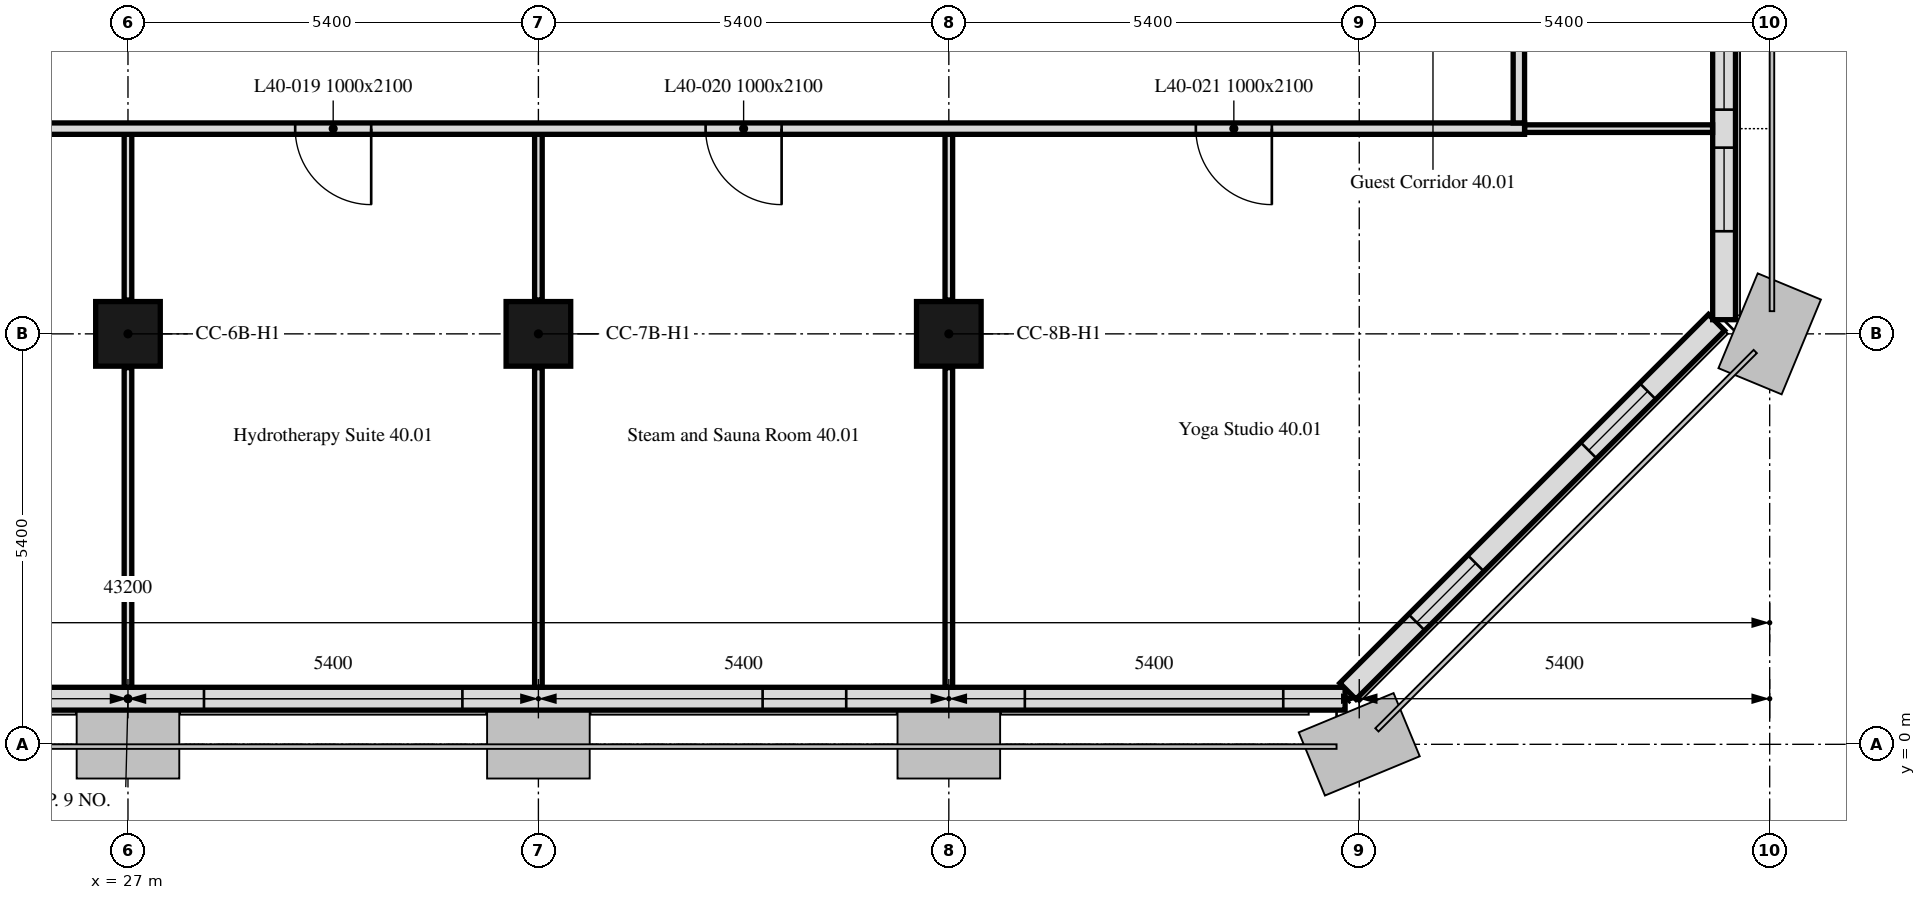
"""IFC4 building model, lengths in metres.
Left out: names, types, materials, properties, quantities, classifications, styles, units other than length and angle.
Written with IfcOpenShell. Run it as: python <this file> out.ifc"""

import sys

from ifc_helpers import new_model, si_unit, direction, frame, frame_2d, origin, origin_2d, place, context, subcontext, project, spatial, rectangle, extrude, element, fill, save


model = new_model("IFC4")
c1 = context("Model", 3, precision=1e-05, world=origin(), true_north=direction((0.0, 1.0)))
c2 = subcontext(c1, "Body", "Model", "MODEL_VIEW")
j1 = project(units=[si_unit("LENGTHUNIT", "METRE"), si_unit("PLANEANGLEUNIT", "RADIAN")], contexts=[c1])
p1 = place(None, origin())
s1 = spatial("IfcSite", under=j1, at=p1, CompositionType="ELEMENT")
p2 = place(p1, origin())
s2 = spatial("IfcBuilding", under=s1, at=p2, CompositionType="ELEMENT")
p3 = place(p2, frame((0.0, 0.0, 169.3)))
s3 = spatial("IfcBuildingStorey", under=s2, at=p3, CompositionType="ELEMENT", Elevation=169.3)
for number, where, z_axis, x_axis in (
    (1, (27.0, 5.4, 0.0), (0.0, 0.0, 1.0), (1.0, 0.0, 0.0)),
    (2, (32.4, 5.4, 0.0), (0.0, 0.0, 1.0), (1.0, 0.0, 0.0)),
    (3, (37.8, 5.4, 0.0), (0.0, 0.0, 1.0), (1.0, 0.0, 0.0)),
):
    element("IfcColumn", number, at=place(p3, frame(where, z_axis=z_axis, x_axis=x_axis)), inside=s3, PredefinedType="COLUMN", context=c2, shape_type="SweptSolid", body=[
        extrude(rectangle(XDim=0.85, YDim=0.85, at=origin_2d()), origin(), (0.0, 0.0, 1.0), 3.0),
    ])
p4 = place(p3, frame((10.986, 0.6, 0.0), z_axis=(0.0, 0.0, 1.0), x_axis=(1.0, 0.0, 0.0)))
e4 = element("IfcWall", 4, at=p4, inside=s3, PredefinedType="SOLIDWALL", context=c2, shape_type="SweptSolid", body=[
    extrude(rectangle(XDim=32.027, YDim=0.3, at=frame_2d((16.014, 0.0))), origin(), (0.0, 0.0, 1.0), 3.0),
])
p5 = place(p4, frame((2.764, 0.0, 0.9)))
e5 = element("IfcOpeningElement", 5, at=p5, cuts=e4, PredefinedType="OPENING", context=c2, shape_type="SweptSolid", body=[
    extrude(rectangle(XDim=1.1, YDim=1.7, at=frame_2d((0.55, 0.85))), frame((0.0, 0.16, 0.0), z_axis=(0.0, -1.0, 0.0), x_axis=(1.0, 0.0, 0.0)), (0.0, 0.0, 1.0), 0.32),
])
p6 = place(p4, frame((6.214, 0.0, 0.9)))
e6 = element("IfcOpeningElement", 6, at=p6, cuts=e4, PredefinedType="OPENING", context=c2, shape_type="SweptSolid", body=[
    extrude(rectangle(XDim=3.4, YDim=1.7, at=frame_2d((1.7, 0.85))), frame((0.0, 0.16, 0.0), z_axis=(0.0, -1.0, 0.0), x_axis=(1.0, 0.0, 0.0)), (0.0, 0.0, 1.0), 0.32),
])
p7 = place(p4, frame((13.564, 0.0, 0.9)))
e7 = element("IfcOpeningElement", 7, at=p7, cuts=e4, PredefinedType="OPENING", context=c2, shape_type="SweptSolid", body=[
    extrude(rectangle(XDim=1.1, YDim=1.7, at=frame_2d((0.55, 0.85))), frame((0.0, 0.16, 0.0), z_axis=(0.0, -1.0, 0.0), x_axis=(1.0, 0.0, 0.0)), (0.0, 0.0, 1.0), 0.32),
])
p8 = place(p4, frame((17.014, 0.0, 0.9)))
e8 = element("IfcOpeningElement", 8, at=p8, cuts=e4, PredefinedType="OPENING", context=c2, shape_type="SweptSolid", body=[
    extrude(rectangle(XDim=3.4, YDim=1.7, at=frame_2d((1.7, 0.85))), frame((0.0, 0.16, 0.0), z_axis=(0.0, -1.0, 0.0), x_axis=(1.0, 0.0, 0.0)), (0.0, 0.0, 1.0), 0.32),
])
p9 = place(p4, frame((24.364, 0.0, 0.9)))
e9 = element("IfcOpeningElement", 9, at=p9, cuts=e4, PredefinedType="OPENING", context=c2, shape_type="SweptSolid", body=[
    extrude(rectangle(XDim=1.1, YDim=1.7, at=frame_2d((0.55, 0.85))), frame((0.0, 0.16, 0.0), z_axis=(0.0, -1.0, 0.0), x_axis=(1.0, 0.0, 0.0)), (0.0, 0.0, 1.0), 0.32),
])
p10 = place(p4, frame((27.814, 0.0, 0.9)))
e10 = element("IfcOpeningElement", 10, at=p10, cuts=e4, PredefinedType="OPENING", context=c2, shape_type="SweptSolid", body=[
    extrude(rectangle(XDim=3.4, YDim=1.7, at=frame_2d((1.7, 0.85))), frame((0.0, 0.16, 0.0), z_axis=(0.0, -1.0, 0.0), x_axis=(1.0, 0.0, 0.0)), (0.0, 0.0, 1.0), 0.32),
])
p11 = place(p3, frame((43.051, 0.699, 0.0), z_axis=(0.0, 0.0, 1.0), x_axis=(0.707106781187, 0.707106781187, 0.0)))
e11 = element("IfcWall", 11, at=p11, inside=s3, PredefinedType="SOLIDWALL", context=c2, shape_type="SweptSolid", body=[
    extrude(rectangle(XDim=6.86, YDim=0.3, at=frame_2d((3.43, 0.0))), origin(), (0.0, 0.0, 1.0), 3.0),
])
p12 = place(p11, frame((1.28, 0.0, 0.9)))
e12 = element("IfcOpeningElement", 12, at=p12, cuts=e11, PredefinedType="OPENING", context=c2, shape_type="SweptSolid", body=[
    extrude(rectangle(XDim=1.1, YDim=1.7, at=frame_2d((0.55, 0.85))), frame((0.0, 0.16, 0.0), z_axis=(0.0, -1.0, 0.0), x_axis=(1.0, 0.0, 0.0)), (0.0, 0.0, 1.0), 0.32),
])
p13 = place(p11, frame((4.48, 0.0, 0.9)))
e13 = element("IfcOpeningElement", 13, at=p13, cuts=e11, PredefinedType="OPENING", context=c2, shape_type="SweptSolid", body=[
    extrude(rectangle(XDim=1.1, YDim=1.7, at=frame_2d((0.55, 0.85))), frame((0.0, 0.16, 0.0), z_axis=(0.0, -1.0, 0.0), x_axis=(1.0, 0.0, 0.0)), (0.0, 0.0, 1.0), 0.32),
])
p14 = place(p3, frame((48.0, 5.586, 0.0), z_axis=(0.0, 0.0, 1.0), x_axis=(0.0, 1.0, 0.0)))
e14 = element("IfcWall", 14, at=p14, inside=s3, PredefinedType="SOLIDWALL", context=c2, shape_type="SweptSolid", body=[
    extrude(rectangle(XDim=32.027, YDim=0.3, at=frame_2d((16.014, 0.0))), origin(), (0.0, 0.0, 1.0), 3.0),
])
p15 = place(p14, frame((1.164, 0.0, 0.9)))
e15 = element("IfcOpeningElement", 15, at=p15, cuts=e14, PredefinedType="OPENING", context=c2, shape_type="SweptSolid", body=[
    extrude(rectangle(XDim=1.1, YDim=1.7, at=frame_2d((0.55, 0.85))), frame((0.0, 0.16, 0.0), z_axis=(0.0, -1.0, 0.0), x_axis=(1.0, 0.0, 0.0)), (0.0, 0.0, 1.0), 0.32),
])
p16 = place(p14, frame((2.764, 0.0, 0.9)))
e16 = element("IfcOpeningElement", 16, at=p16, cuts=e14, PredefinedType="OPENING", context=c2, shape_type="SweptSolid", body=[
    extrude(rectangle(XDim=1.1, YDim=1.7, at=frame_2d((0.55, 0.85))), frame((0.0, 0.16, 0.0), z_axis=(0.0, -1.0, 0.0), x_axis=(1.0, 0.0, 0.0)), (0.0, 0.0, 1.0), 0.32),
])
p17 = place(p14, frame((6.214, 0.0, 0.9)))
e17 = element("IfcOpeningElement", 17, at=p17, cuts=e14, PredefinedType="OPENING", context=c2, shape_type="SweptSolid", body=[
    extrude(rectangle(XDim=3.4, YDim=1.7, at=frame_2d((1.7, 0.85))), frame((0.0, 0.16, 0.0), z_axis=(0.0, -1.0, 0.0), x_axis=(1.0, 0.0, 0.0)), (0.0, 0.0, 1.0), 0.32),
])
p18 = place(p14, frame((11.964, 0.0, 0.9)))
e18 = element("IfcOpeningElement", 18, at=p18, cuts=e14, PredefinedType="OPENING", context=c2, shape_type="SweptSolid", body=[
    extrude(rectangle(XDim=1.1, YDim=1.7, at=frame_2d((0.55, 0.85))), frame((0.0, 0.16, 0.0), z_axis=(0.0, -1.0, 0.0), x_axis=(1.0, 0.0, 0.0)), (0.0, 0.0, 1.0), 0.32),
])
p19 = place(p14, frame((13.564, 0.0, 0.9)))
e19 = element("IfcOpeningElement", 19, at=p19, cuts=e14, PredefinedType="OPENING", context=c2, shape_type="SweptSolid", body=[
    extrude(rectangle(XDim=1.1, YDim=1.7, at=frame_2d((0.55, 0.85))), frame((0.0, 0.16, 0.0), z_axis=(0.0, -1.0, 0.0), x_axis=(1.0, 0.0, 0.0)), (0.0, 0.0, 1.0), 0.32),
])
p20 = place(p14, frame((17.364, 0.0, 0.9)))
e20 = element("IfcOpeningElement", 20, at=p20, cuts=e14, PredefinedType="OPENING", context=c2, shape_type="SweptSolid", body=[
    extrude(rectangle(XDim=1.1, YDim=1.7, at=frame_2d((0.55, 0.85))), frame((0.0, 0.16, 0.0), z_axis=(0.0, -1.0, 0.0), x_axis=(1.0, 0.0, 0.0)), (0.0, 0.0, 1.0), 0.32),
])
p21 = place(p14, frame((18.964, 0.0, 0.9)))
e21 = element("IfcOpeningElement", 21, at=p21, cuts=e14, PredefinedType="OPENING", context=c2, shape_type="SweptSolid", body=[
    extrude(rectangle(XDim=1.1, YDim=1.7, at=frame_2d((0.55, 0.85))), frame((0.0, 0.16, 0.0), z_axis=(0.0, -1.0, 0.0), x_axis=(1.0, 0.0, 0.0)), (0.0, 0.0, 1.0), 0.32),
])
p22 = place(p14, frame((22.764, 0.0, 0.9)))
e22 = element("IfcOpeningElement", 22, at=p22, cuts=e14, PredefinedType="OPENING", context=c2, shape_type="SweptSolid", body=[
    extrude(rectangle(XDim=1.1, YDim=1.7, at=frame_2d((0.55, 0.85))), frame((0.0, 0.16, 0.0), z_axis=(0.0, -1.0, 0.0), x_axis=(1.0, 0.0, 0.0)), (0.0, 0.0, 1.0), 0.32),
])
p23 = place(p14, frame((24.364, 0.0, 0.9)))
e23 = element("IfcOpeningElement", 23, at=p23, cuts=e14, PredefinedType="OPENING", context=c2, shape_type="SweptSolid", body=[
    extrude(rectangle(XDim=1.1, YDim=1.7, at=frame_2d((0.55, 0.85))), frame((0.0, 0.16, 0.0), z_axis=(0.0, -1.0, 0.0), x_axis=(1.0, 0.0, 0.0)), (0.0, 0.0, 1.0), 0.32),
])
p24 = place(p14, frame((27.814, 0.0, 0.9)))
e24 = element("IfcOpeningElement", 24, at=p24, cuts=e14, PredefinedType="OPENING", context=c2, shape_type="SweptSolid", body=[
    extrude(rectangle(XDim=3.4, YDim=1.7, at=frame_2d((1.7, 0.85))), frame((0.0, 0.16, 0.0), z_axis=(0.0, -1.0, 0.0), x_axis=(1.0, 0.0, 0.0)), (0.0, 0.0, 1.0), 0.32),
])
p25 = place(p3, frame((45.375, 8.1, 0.0), z_axis=(0.0, 0.0, 1.0), x_axis=(1.0, 0.0, 0.0)))
e25 = element("IfcWall", 25, at=p25, inside=s3, PredefinedType="PARTITIONING", context=c2, shape_type="SweptSolid", body=[
    extrude(rectangle(XDim=2.474, YDim=0.1, at=frame_2d((1.237, 0.0))), origin(), (0.0, 0.0, 1.0), 3.0),
])
p26 = place(p3, frame((27.0, 0.751, 0.0), z_axis=(0.0, 0.0, 1.0), x_axis=(0.0, 1.0, 0.0)))
e26 = element("IfcWall", 26, at=p26, inside=s3, PredefinedType="PARTITIONING", context=c2, shape_type="SweptSolid", body=[
    extrude(rectangle(XDim=4.204, YDim=0.1, at=frame_2d((2.102, 0.0))), origin(), (0.0, 0.0, 1.0), 2.4),
])
p27 = place(p3, frame((27.0, 5.845, 0.0), z_axis=(0.0, 0.0, 1.0), x_axis=(0.0, 1.0, 0.0)))
e27 = element("IfcWall", 27, at=p27, inside=s3, PredefinedType="PARTITIONING", context=c2, shape_type="SweptSolid", body=[
    extrude(rectangle(XDim=2.18, YDim=0.1, at=frame_2d((1.09, 0.0))), origin(), (0.0, 0.0, 1.0), 2.4),
])
p28 = place(p3, frame((32.4, 0.751, 0.0), z_axis=(0.0, 0.0, 1.0), x_axis=(0.0, 1.0, 0.0)))
e28 = element("IfcWall", 28, at=p28, inside=s3, PredefinedType="PARTITIONING", context=c2, shape_type="SweptSolid", body=[
    extrude(rectangle(XDim=4.204, YDim=0.1, at=frame_2d((2.102, 0.0))), origin(), (0.0, 0.0, 1.0), 2.4),
])
p29 = place(p3, frame((32.4, 5.845, 0.0), z_axis=(0.0, 0.0, 1.0), x_axis=(0.0, 1.0, 0.0)))
e29 = element("IfcWall", 29, at=p29, inside=s3, PredefinedType="PARTITIONING", context=c2, shape_type="SweptSolid", body=[
    extrude(rectangle(XDim=2.18, YDim=0.1, at=frame_2d((1.09, 0.0))), origin(), (0.0, 0.0, 1.0), 2.4),
])
p30 = place(p3, frame((37.8, 0.751, 0.0), z_axis=(0.0, 0.0, 1.0), x_axis=(0.0, 1.0, 0.0)))
e30 = element("IfcWall", 30, at=p30, inside=s3, PredefinedType="PARTITIONING", context=c2, shape_type="SweptSolid", body=[
    extrude(rectangle(XDim=4.204, YDim=0.1, at=frame_2d((2.102, 0.0))), origin(), (0.0, 0.0, 1.0), 2.4),
])
p31 = place(p3, frame((37.8, 5.845, 0.0), z_axis=(0.0, 0.0, 1.0), x_axis=(0.0, 1.0, 0.0)))
e31 = element("IfcWall", 31, at=p31, inside=s3, PredefinedType="PARTITIONING", context=c2, shape_type="SweptSolid", body=[
    extrude(rectangle(XDim=2.18, YDim=0.1, at=frame_2d((1.09, 0.0))), origin(), (0.0, 0.0, 1.0), 2.4),
])
p32 = place(p3, frame((45.375, 8.1, 0.0), z_axis=(0.0, 0.0, 1.0), x_axis=(-1.0, 0.0, 0.0)))
e32 = element("IfcWall", 32, at=p32, inside=s3, PredefinedType="PARTITIONING", context=c2, shape_type="SweptSolid", body=[
    extrude(rectangle(XDim=39.224, YDim=0.15, at=frame_2d((19.612, 0.0))), origin(), (0.0, 0.0, 1.0), 2.4),
])
p33 = place(p32, frame((36.775, 0.0, 0.0)))
e33 = element("IfcOpeningElement", 33, at=p33, cuts=e32, PredefinedType="OPENING", context=c2, shape_type="SweptSolid", body=[
    extrude(rectangle(XDim=1.0, YDim=2.1, at=frame_2d((0.5, 1.05))), frame((0.0, 0.075, 0.0), z_axis=(0.0, -1.0, 0.0), x_axis=(1.0, 0.0, 0.0)), (0.0, 0.0, 1.0), 0.15),
])
p34 = place(p32, frame((31.375, 0.0, 0.0)))
e34 = element("IfcOpeningElement", 34, at=p34, cuts=e32, PredefinedType="OPENING", context=c2, shape_type="SweptSolid", body=[
    extrude(rectangle(XDim=1.0, YDim=2.1, at=frame_2d((0.5, 1.05))), frame((0.0, 0.075, 0.0), z_axis=(0.0, -1.0, 0.0), x_axis=(1.0, 0.0, 0.0)), (0.0, 0.0, 1.0), 0.15),
])
p35 = place(p32, frame((25.975, 0.0, 0.0)))
e35 = element("IfcOpeningElement", 35, at=p35, cuts=e32, PredefinedType="OPENING", context=c2, shape_type="SweptSolid", body=[
    extrude(rectangle(XDim=1.0, YDim=2.1, at=frame_2d((0.5, 1.05))), frame((0.0, 0.075, 0.0), z_axis=(0.0, -1.0, 0.0), x_axis=(1.0, 0.0, 0.0)), (0.0, 0.0, 1.0), 0.15),
])
p36 = place(p32, frame((20.575, 0.0, 0.0)))
e36 = element("IfcOpeningElement", 36, at=p36, cuts=e32, PredefinedType="OPENING", context=c2, shape_type="SweptSolid", body=[
    extrude(rectangle(XDim=1.0, YDim=2.1, at=frame_2d((0.5, 1.05))), frame((0.0, 0.075, 0.0), z_axis=(0.0, -1.0, 0.0), x_axis=(1.0, 0.0, 0.0)), (0.0, 0.0, 1.0), 0.15),
])
p37 = place(p32, frame((15.175, 0.0, 0.0)))
e37 = element("IfcOpeningElement", 37, at=p37, cuts=e32, PredefinedType="OPENING", context=c2, shape_type="SweptSolid", body=[
    extrude(rectangle(XDim=1.0, YDim=2.1, at=frame_2d((0.5, 1.05))), frame((0.0, 0.075, 0.0), z_axis=(0.0, -1.0, 0.0), x_axis=(1.0, 0.0, 0.0)), (0.0, 0.0, 1.0), 0.15),
])
p38 = place(p32, frame((9.775, 0.0, 0.0)))
e38 = element("IfcOpeningElement", 38, at=p38, cuts=e32, PredefinedType="OPENING", context=c2, shape_type="SweptSolid", body=[
    extrude(rectangle(XDim=1.0, YDim=2.1, at=frame_2d((0.5, 1.05))), frame((0.0, 0.075, 0.0), z_axis=(0.0, -1.0, 0.0), x_axis=(1.0, 0.0, 0.0)), (0.0, 0.0, 1.0), 0.15),
])
p39 = place(p32, frame((3.325, 0.0, 0.0)))
e39 = element("IfcOpeningElement", 39, at=p39, cuts=e32, PredefinedType="OPENING", context=c2, shape_type="SweptSolid", body=[
    extrude(rectangle(XDim=1.0, YDim=2.1, at=frame_2d((0.5, 1.05))), frame((0.0, 0.075, 0.0), z_axis=(0.0, -1.0, 0.0), x_axis=(1.0, 0.0, 0.0)), (0.0, 0.0, 1.0), 0.15),
])
p40 = place(p3, frame((45.3, 21.525, 0.0), z_axis=(0.0, 0.0, 1.0), x_axis=(0.0, -1.0, 0.0)))
e40 = element("IfcWall", 40, at=p40, inside=s3, PredefinedType="PARTITIONING", context=c2, shape_type="SweptSolid", body=[
    extrude(rectangle(XDim=13.35, YDim=0.15, at=frame_2d((6.675, 0.0))), origin(), (0.0, 0.0, 1.0), 2.4),
])
p41 = place(p40, frame((8.063, 0.0, 0.0)))
e41 = element("IfcOpeningElement", 41, at=p41, cuts=e40, PredefinedType="OPENING", context=c2, shape_type="SweptSolid", body=[
    extrude(rectangle(XDim=1.0, YDim=2.1, at=frame_2d((0.5, 1.05))), frame((0.0, 0.075, 0.0), z_axis=(0.0, -1.0, 0.0), x_axis=(1.0, 0.0, 0.0)), (0.0, 0.0, 1.0), 0.15),
])
p42 = place(p40, frame((2.125, 0.0, 0.0)))
e42 = element("IfcOpeningElement", 42, at=p42, cuts=e40, PredefinedType="OPENING", context=c2, shape_type="SweptSolid", body=[
    extrude(rectangle(XDim=1.0, YDim=2.1, at=frame_2d((0.5, 1.05))), frame((0.0, 0.075, 0.0), z_axis=(0.0, -1.0, 0.0), x_axis=(1.0, 0.0, 0.0)), (0.0, 0.0, 1.0), 0.15),
])
p43 = place(p8, origin())
e43 = element("IfcWindow", 43, at=p43, inside=s3, PartitioningType="SINGLE_PANEL", PredefinedType="WINDOW", context=c2, shape_type="SweptSolid", body=[
    extrude(rectangle(XDim=3.4, YDim=1.7, at=frame_2d((1.7, 0.85))), frame((0.0, 0.03, 0.0), z_axis=(0.0, -1.0, 0.0), x_axis=(1.0, 0.0, 0.0)), (0.0, 0.0, 1.0), 0.06),
])
fill(e8, e43)
p44 = place(p9, origin())
e44 = element("IfcWindow", 44, at=p44, inside=s3, PartitioningType="SINGLE_PANEL", PredefinedType="WINDOW", context=c2, shape_type="SweptSolid", body=[
    extrude(rectangle(XDim=1.1, YDim=1.7, at=frame_2d((0.55, 0.85))), frame((0.0, 0.03, 0.0), z_axis=(0.0, -1.0, 0.0), x_axis=(1.0, 0.0, 0.0)), (0.0, 0.0, 1.0), 0.06),
])
fill(e9, e44)
p45 = place(p10, origin())
e45 = element("IfcWindow", 45, at=p45, inside=s3, PartitioningType="SINGLE_PANEL", PredefinedType="WINDOW", context=c2, shape_type="SweptSolid", body=[
    extrude(rectangle(XDim=3.4, YDim=1.7, at=frame_2d((1.7, 0.85))), frame((0.0, 0.03, 0.0), z_axis=(0.0, -1.0, 0.0), x_axis=(1.0, 0.0, 0.0)), (0.0, 0.0, 1.0), 0.06),
])
fill(e10, e45)
p46 = place(p12, origin())
e46 = element("IfcWindow", 46, at=p46, inside=s3, PartitioningType="SINGLE_PANEL", PredefinedType="WINDOW", context=c2, shape_type="SweptSolid", body=[
    extrude(rectangle(XDim=1.1, YDim=1.7, at=frame_2d((0.55, 0.85))), frame((0.0, 0.03, 0.0), z_axis=(0.0, -1.0, 0.0), x_axis=(1.0, 0.0, 0.0)), (0.0, 0.0, 1.0), 0.06),
])
fill(e12, e46)
p47 = place(p13, origin())
e47 = element("IfcWindow", 47, at=p47, inside=s3, PartitioningType="SINGLE_PANEL", PredefinedType="WINDOW", context=c2, shape_type="SweptSolid", body=[
    extrude(rectangle(XDim=1.1, YDim=1.7, at=frame_2d((0.55, 0.85))), frame((0.0, 0.03, 0.0), z_axis=(0.0, -1.0, 0.0), x_axis=(1.0, 0.0, 0.0)), (0.0, 0.0, 1.0), 0.06),
])
fill(e13, e47)
p48 = place(p15, origin())
e48 = element("IfcWindow", 48, at=p48, inside=s3, PartitioningType="SINGLE_PANEL", PredefinedType="WINDOW", context=c2, shape_type="SweptSolid", body=[
    extrude(rectangle(XDim=1.1, YDim=1.7, at=frame_2d((0.55, 0.85))), frame((0.0, 0.03, 0.0), z_axis=(0.0, -1.0, 0.0), x_axis=(1.0, 0.0, 0.0)), (0.0, 0.0, 1.0), 0.06),
])
fill(e15, e48)
p49 = place(p16, origin())
e49 = element("IfcWindow", 49, at=p49, inside=s3, PartitioningType="SINGLE_PANEL", PredefinedType="WINDOW", context=c2, shape_type="SweptSolid", body=[
    extrude(rectangle(XDim=1.1, YDim=1.7, at=frame_2d((0.55, 0.85))), frame((0.0, 0.03, 0.0), z_axis=(0.0, -1.0, 0.0), x_axis=(1.0, 0.0, 0.0)), (0.0, 0.0, 1.0), 0.06),
])
fill(e16, e49)
p50 = place(p37, origin())
e50 = element("IfcDoor", 50, at=p50, inside=s3, OperationType="SINGLE_SWING_LEFT", PredefinedType="DOOR", context=c2, shape_type="SweptSolid", body=[
    extrude(rectangle(XDim=1.0, YDim=2.1, at=frame_2d((0.5, 1.05))), frame((0.0, 0.025, 0.0), z_axis=(0.0, -1.0, 0.0), x_axis=(1.0, 0.0, 0.0)), (0.0, 0.0, 1.0), 0.05),
])
fill(e37, e50)
p51 = place(p38, origin())
e51 = element("IfcDoor", 51, at=p51, inside=s3, OperationType="SINGLE_SWING_RIGHT", PredefinedType="DOOR", context=c2, shape_type="SweptSolid", body=[
    extrude(rectangle(XDim=1.0, YDim=2.1, at=frame_2d((0.5, 1.05))), frame((0.0, 0.025, 0.0), z_axis=(0.0, -1.0, 0.0), x_axis=(1.0, 0.0, 0.0)), (0.0, 0.0, 1.0), 0.05),
])
fill(e38, e51)
p52 = place(p39, origin())
e52 = element("IfcDoor", 52, at=p52, inside=s3, OperationType="SINGLE_SWING_RIGHT", PredefinedType="DOOR", context=c2, shape_type="SweptSolid", body=[
    extrude(rectangle(XDim=1.0, YDim=2.1, at=frame_2d((0.5, 1.05))), frame((0.0, 0.025, 0.0), z_axis=(0.0, -1.0, 0.0), x_axis=(1.0, 0.0, 0.0)), (0.0, 0.0, 1.0), 0.05),
])
fill(e39, e52)
save(model, sys.argv[1])
